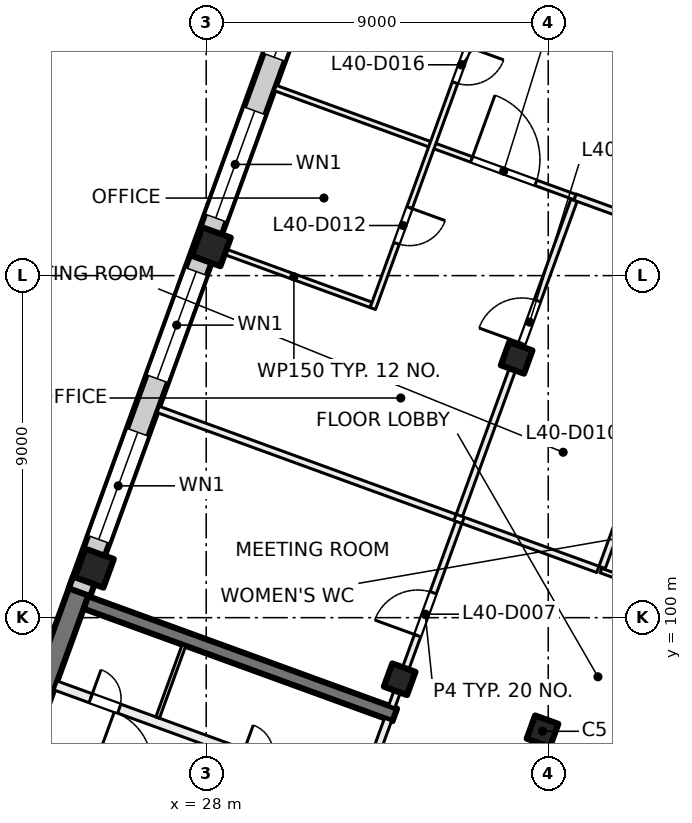
"""IFC4 building model, lengths in metres.
Left out: names, types, materials, properties, quantities, classifications, styles, units other than length and angle.
Written with IfcOpenShell. Run it as: python <this file> out.ifc"""

import sys

from ifc_helpers import new_model, si_unit, direction, frame, frame_2d, origin, origin_2d, place, context, subcontext, project, spatial, rectangle, extrude, element, fill, save


model = new_model("IFC4")
c1 = context("Model", 3, precision=1e-05, world=origin(), true_north=direction((0.0, 1.0)))
c2 = subcontext(c1, "Body", "Model", "MODEL_VIEW")
j1 = project(units=[si_unit("LENGTHUNIT", "METRE"), si_unit("PLANEANGLEUNIT", "RADIAN")], contexts=[c1])
p1 = place(None, origin())
s1 = spatial("IfcSite", under=j1, at=p1, CompositionType="ELEMENT")
p2 = place(p1, origin())
s2 = spatial("IfcBuilding", under=s1, at=p2, CompositionType="ELEMENT")
p3 = place(p2, frame((0.0, 0.0, 170.5)))
s3 = spatial("IfcBuildingStorey", under=s2, at=p3, CompositionType="ELEMENT", Elevation=170.5)
for number, where, z_axis, x_axis in (
    (1, (36.849, 97.011, 0.0), (0.0, 0.0, 1.0), (-0.342, -0.94, 0.0)),
    (2, (36.169, 106.836, 0.0), (0.0, 0.0, 1.0), (-0.342, -0.94, 0.0)),
    (3, (33.091, 98.379, 0.0), (0.0, 0.0, 1.0), (-0.342, -0.94, 0.0)),
):
    element("IfcColumn", number, at=place(p3, frame(where, z_axis=z_axis, x_axis=x_axis)), inside=s3, PredefinedType="COLUMN", context=c2, shape_type="SweptSolid", body=[
        extrude(rectangle(XDim=0.65, YDim=0.65, at=origin_2d()), origin(), (0.0, 0.0, 1.0), 4.0),
    ])
for number, where, z_axis, x_axis in (
    (4, (28.134, 109.76, 0.0), (0.0, 0.0, 1.0), (-0.342, -0.94, 0.0)),
    (5, (25.056, 101.303, 0.0), (0.0, 0.0, 1.0), (-0.342, -0.94, 0.0)),
):
    element("IfcColumn", number, at=place(p3, frame(where, z_axis=z_axis, x_axis=x_axis)), inside=s3, PredefinedType="COLUMN", context=c2, shape_type="SweptSolid", body=[
        extrude(rectangle(XDim=0.8, YDim=0.8, at=origin_2d()), origin(), (0.0, 0.0, 1.0), 4.0),
    ])
p4 = place(p3, frame((21.694, 92.577, 0.0), z_axis=(0.0, 0.0, 1.0), x_axis=(0.342010253184, 0.939696220444, 0.0)))
e6 = element("IfcWall", 6, at=p4, inside=s3, PredefinedType="SHEAR", context=c2, shape_type="SweptSolid", body=[
    extrude(rectangle(XDim=8.95, YDim=0.55, at=frame_2d((4.475, 0.0))), origin(), (0.0, 0.0, 1.0), 4.0),
])
p5 = place(p3, frame((32.962, 97.441, 0.0), z_axis=(0.0, 0.0, 1.0), x_axis=(-0.939689545667, 0.342028592028, 0.0)))
e7 = element("IfcWall", 7, at=p5, inside=s3, PredefinedType="SHEAR", context=c2, shape_type="SweptSolid", body=[
    extrude(rectangle(XDim=8.65, YDim=0.35, at=frame_2d((4.325, 0.0))), origin(), (0.0, 0.0, 1.0), 4.0),
])
p6 = place(p3, frame((24.666, 100.669, 0.0), z_axis=(0.0, 0.0, 1.0), x_axis=(0.34201964167, 0.939692803373, 0.0)))
e8 = element("IfcWall", 8, at=p6, inside=s3, PredefinedType="SOLIDWALL", context=c2, shape_type="SweptSolid", body=[
    extrude(rectangle(XDim=32.884, YDim=0.6, at=frame_2d((16.442, 0.0))), origin(), (0.0, 0.0, 1.0), 3.625),
])
p7 = place(p6, frame((1.48, 0.0, 0.9)))
e9 = element("IfcOpeningElement", 9, at=p7, cuts=e8, PredefinedType="OPENING", context=c2, shape_type="SweptSolid", body=[
    extrude(rectangle(XDim=3.0, YDim=2.4, at=frame_2d((1.5, 1.2))), frame((0.0, 0.31, 0.0), z_axis=(0.0, -1.0, 0.0), x_axis=(1.0, 0.0, 0.0)), (0.0, 0.0, 1.0), 0.62),
])
p8 = place(p6, frame((5.98, 0.0, 0.9)))
e10 = element("IfcOpeningElement", 10, at=p8, cuts=e8, PredefinedType="OPENING", context=c2, shape_type="SweptSolid", body=[
    extrude(rectangle(XDim=3.0, YDim=2.4, at=frame_2d((1.5, 1.2))), frame((0.0, 0.31, 0.0), z_axis=(0.0, -1.0, 0.0), x_axis=(1.0, 0.0, 0.0)), (0.0, 0.0, 1.0), 0.62),
])
p9 = place(p6, frame((10.48, 0.0, 0.9)))
e11 = element("IfcOpeningElement", 11, at=p9, cuts=e8, PredefinedType="OPENING", context=c2, shape_type="SweptSolid", body=[
    extrude(rectangle(XDim=3.0, YDim=2.4, at=frame_2d((1.5, 1.2))), frame((0.0, 0.31, 0.0), z_axis=(0.0, -1.0, 0.0), x_axis=(1.0, 0.0, 0.0)), (0.0, 0.0, 1.0), 0.62),
])
p10 = place(p6, frame((14.98, 0.0, 0.9)))
e12 = element("IfcOpeningElement", 12, at=p10, cuts=e8, PredefinedType="OPENING", context=c2, shape_type="SweptSolid", body=[
    extrude(rectangle(XDim=3.0, YDim=2.4, at=frame_2d((1.5, 1.2))), frame((0.0, 0.31, 0.0), z_axis=(0.0, -1.0, 0.0), x_axis=(1.0, 0.0, 0.0)), (0.0, 0.0, 1.0), 0.62),
])
p11 = place(p6, frame((19.48, 0.0, 0.9)))
e13 = element("IfcOpeningElement", 13, at=p11, cuts=e8, PredefinedType="OPENING", context=c2, shape_type="SweptSolid", body=[
    extrude(rectangle(XDim=3.0, YDim=2.4, at=frame_2d((1.5, 1.2))), frame((0.0, 0.31, 0.0), z_axis=(0.0, -1.0, 0.0), x_axis=(1.0, 0.0, 0.0)), (0.0, 0.0, 1.0), 0.62),
])
p12 = place(p6, frame((23.98, 0.0, 0.9)))
e14 = element("IfcOpeningElement", 14, at=p12, cuts=e8, PredefinedType="OPENING", context=c2, shape_type="SweptSolid", body=[
    extrude(rectangle(XDim=3.0, YDim=2.4, at=frame_2d((1.5, 1.2))), frame((0.0, 0.31, 0.0), z_axis=(0.0, -1.0, 0.0), x_axis=(1.0, 0.0, 0.0)), (0.0, 0.0, 1.0), 0.62),
])
p13 = place(p6, frame((28.48, 0.0, 0.9)))
e15 = element("IfcOpeningElement", 15, at=p13, cuts=e8, PredefinedType="OPENING", context=c2, shape_type="SweptSolid", body=[
    extrude(rectangle(XDim=3.0, YDim=2.4, at=frame_2d((1.5, 1.2))), frame((0.0, 0.31, 0.0), z_axis=(0.0, -1.0, 0.0), x_axis=(1.0, 0.0, 0.0)), (0.0, 0.0, 1.0), 0.62),
])
p14 = place(p3, frame((31.459, 93.678, 0.0), z_axis=(0.0, 0.0, 1.0), x_axis=(0.341985870128, 0.939705094502, 0.0)))
e16 = element("IfcWall", 16, at=p14, inside=s3, PredefinedType="PARTITIONING", context=c2, shape_type="SweptSolid", body=[
    extrude(rectangle(XDim=3.875, YDim=0.2, at=frame_2d((1.938, 0.0))), origin(), (0.0, 0.0, 1.0), 3.625),
])
p15 = place(p14, frame((0.3, 0.0, 0.0)))
e17 = element("IfcOpeningElement", 17, at=p15, cuts=e16, PredefinedType="OPENING", context=c2, shape_type="SweptSolid", body=[
    extrude(rectangle(XDim=1.2, YDim=2.1, at=frame_2d((0.6, 1.05))), frame((0.0, 0.11, 0.0), z_axis=(0.0, -1.0, 0.0), x_axis=(1.0, 0.0, 0.0)), (0.0, 0.0, 1.0), 0.22),
])
p16 = place(p3, frame((23.483, 96.688, 0.0), z_axis=(0.0, 0.0, 1.0), x_axis=(0.939691007314, -0.342024576271, 0.0)))
e18 = element("IfcWall", 18, at=p16, inside=s3, PredefinedType="PARTITIONING", context=c2, shape_type="SweptSolid", body=[
    extrude(rectangle(XDim=8.425, YDim=0.2, at=frame_2d((4.212, 0.0))), origin(), (0.0, 0.0, 1.0), 3.625),
])
p17 = place(p16, frame((1.688, 0.0, 0.0)))
e19 = element("IfcOpeningElement", 19, at=p17, cuts=e18, PredefinedType="OPENING", context=c2, shape_type="SweptSolid", body=[
    extrude(rectangle(XDim=1.5, YDim=2.1, at=frame_2d((0.75, 1.05))), frame((0.0, 0.11, 0.0), z_axis=(0.0, -1.0, 0.0), x_axis=(1.0, 0.0, 0.0)), (0.0, 0.0, 1.0), 0.22),
])
p18 = place(p3, frame((24.039, 98.215, 0.0), z_axis=(0.0, 0.0, 1.0), x_axis=(0.939687617333, -0.342033889887, 0.0)))
e20 = element("IfcWall", 20, at=p18, inside=s3, PredefinedType="PARTITIONING", context=c2, shape_type="SweptSolid", body=[
    extrude(rectangle(XDim=8.425, YDim=0.25, at=frame_2d((4.212, 0.0))), origin(), (0.0, 0.0, 1.0), 3.625),
])
p19 = place(p18, frame((5.242, 0.0, 0.0)))
e21 = element("IfcOpeningElement", 21, at=p19, cuts=e20, PredefinedType="OPENING", context=c2, shape_type="SweptSolid", body=[
    extrude(rectangle(XDim=0.8, YDim=2.1, at=frame_2d((0.4, 1.05))), frame((0.0, 0.135, 0.0), z_axis=(0.0, -1.0, 0.0), x_axis=(1.0, 0.0, 0.0)), (0.0, 0.0, 1.0), 0.27),
])
p20 = place(p18, frame((0.98, 0.0, 0.0)))
e22 = element("IfcOpeningElement", 22, at=p20, cuts=e20, PredefinedType="OPENING", context=c2, shape_type="SweptSolid", body=[
    extrude(rectangle(XDim=0.8, YDim=2.1, at=frame_2d((0.4, 1.05))), frame((0.0, 0.135, 0.0), z_axis=(0.0, -1.0, 0.0), x_axis=(1.0, 0.0, 0.0)), (0.0, 0.0, 1.0), 0.27),
])
p21 = place(p3, frame((26.722, 97.371, 0.0), z_axis=(0.0, 0.0, 1.0), x_axis=(0.342004391282, 0.939698353911, 0.0)))
e23 = element("IfcWall", 23, at=p21, inside=s3, PredefinedType="PARTITIONING", context=c2, shape_type="SweptSolid", body=[
    extrude(rectangle(XDim=2.025, YDim=0.1, at=frame_2d((1.013, 0.0))), origin(), (0.0, 0.0, 1.0), 3.625),
])
p22 = place(p3, frame((26.736, 105.48, 0.0), z_axis=(0.0, 0.0, 1.0), x_axis=(0.939705074886, -0.341985924028, 0.0)))
e24 = element("IfcWall", 24, at=p22, inside=s3, PredefinedType="PARTITIONING", context=c2, shape_type="SweptSolid", body=[
    extrude(rectangle(XDim=8.313, YDim=0.175, at=frame_2d((4.157, 0.0))), origin(), (0.0, 0.0, 1.0), 3.625),
])
p23 = place(p3, frame((29.814, 113.938, 0.0), z_axis=(0.0, 0.0, 1.0), x_axis=(0.939698351515, -0.342004397867, 0.0)))
e25 = element("IfcWall", 25, at=p23, inside=s3, PredefinedType="PARTITIONING", context=c2, shape_type="SweptSolid", body=[
    extrude(rectangle(XDim=8.401, YDim=0.15, at=frame_2d((4.2, 0.0))), origin(), (0.0, 0.0, 1.0), 3.625),
])
p24 = place(p23, frame((5.5, 0.0, 0.0)))
e26 = element("IfcOpeningElement", 26, at=p24, cuts=e25, PredefinedType="OPENING", context=c2, shape_type="SweptSolid", body=[
    extrude(rectangle(XDim=1.8, YDim=2.1, at=frame_2d((0.9, 1.05))), frame((0.0, 0.085, 0.0), z_axis=(0.0, -1.0, 0.0), x_axis=(1.0, 0.0, 0.0)), (0.0, 0.0, 1.0), 0.17),
])
p25 = place(p3, frame((32.34, 108.23, 0.0), z_axis=(0.0, 0.0, 1.0), x_axis=(-0.939737385516, 0.341897128188, 0.0)))
e27 = element("IfcWall", 27, at=p25, inside=s3, PredefinedType="PARTITIONING", context=c2, shape_type="SweptSolid", body=[
    extrude(rectangle(XDim=4.326, YDim=0.15, at=frame_2d((2.163, 0.0))), origin(), (0.0, 0.0, 1.0), 3.625),
])
p26 = place(p3, frame((37.053, 120.96, 0.0), z_axis=(0.0, 0.0, 1.0), x_axis=(-0.342064742067, -0.939676386973, 0.0)))
e28 = element("IfcWall", 28, at=p26, inside=s3, PredefinedType="PARTITIONING", context=c2, shape_type="SweptSolid", body=[
    extrude(rectangle(XDim=13.649, YDim=0.15, at=frame_2d((6.825, 0.0))), origin(), (0.0, 0.0, 1.0), 3.625),
])
p27 = place(p26, frame((10.824, 0.0, 0.0)))
e29 = element("IfcOpeningElement", 29, at=p27, cuts=e28, PredefinedType="OPENING", context=c2, shape_type="SweptSolid", body=[
    extrude(rectangle(XDim=1.0, YDim=2.1, at=frame_2d((0.5, 1.05))), frame((0.0, 0.085, 0.0), z_axis=(0.0, -1.0, 0.0), x_axis=(1.0, 0.0, 0.0)), (0.0, 0.0, 1.0), 0.17),
])
p28 = place(p26, frame((6.324, 0.0, 0.0)))
e30 = element("IfcOpeningElement", 30, at=p28, cuts=e28, PredefinedType="OPENING", context=c2, shape_type="SweptSolid", body=[
    extrude(rectangle(XDim=1.0, YDim=2.1, at=frame_2d((0.5, 1.05))), frame((0.0, 0.085, 0.0), z_axis=(0.0, -1.0, 0.0), x_axis=(1.0, 0.0, 0.0)), (0.0, 0.0, 1.0), 0.17),
])
p29 = place(p26, frame((1.824, 0.0, 0.0)))
e31 = element("IfcOpeningElement", 31, at=p29, cuts=e28, PredefinedType="OPENING", context=c2, shape_type="SweptSolid", body=[
    extrude(rectangle(XDim=1.0, YDim=2.1, at=frame_2d((0.5, 1.05))), frame((0.0, 0.085, 0.0), z_axis=(0.0, -1.0, 0.0), x_axis=(1.0, 0.0, 0.0)), (0.0, 0.0, 1.0), 0.17),
])
p30 = place(p3, frame((32.881, 97.657, 0.0), z_axis=(0.0, 0.0, 1.0), x_axis=(0.342058204353, 0.939678766832, 0.0)))
e32 = element("IfcWall", 32, at=p30, inside=s3, PredefinedType="PARTITIONING", context=c2, shape_type="SweptSolid", body=[
    extrude(rectangle(XDim=5.163, YDim=0.175, at=frame_2d((2.581, 0.0))), origin(), (0.0, 0.0, 1.0), 3.625),
])
p31 = place(p30, frame((1.991, 0.0, 0.0)))
e33 = element("IfcOpeningElement", 33, at=p31, cuts=e32, PredefinedType="OPENING", context=c2, shape_type="SweptSolid", body=[
    extrude(rectangle(XDim=1.2, YDim=2.1, at=frame_2d((0.6, 1.05))), frame((0.0, 0.097, 0.0), z_axis=(0.0, -1.0, 0.0), x_axis=(1.0, 0.0, 0.0)), (0.0, 0.0, 1.0), 0.195),
])
p32 = place(p3, frame((34.759, 102.56, 0.0), z_axis=(0.0, 0.0, 1.0), x_axis=(0.939770757411, -0.341805388365, 0.0)))
e34 = element("IfcWall", 34, at=p32, inside=s3, PredefinedType="PARTITIONING", context=c2, shape_type="SweptSolid", body=[
    extrude(rectangle(XDim=3.774, YDim=0.175, at=frame_2d((1.887, 0.0))), origin(), (0.0, 0.0, 1.0), 3.625),
])
p33 = place(p3, frame((34.66, 102.689, 0.0), z_axis=(0.0, 0.0, 1.0), x_axis=(0.341951828534, 0.939717482524, 0.0)))
e35 = element("IfcWall", 35, at=p33, inside=s3, PredefinedType="PARTITIONING", context=c2, shape_type="SweptSolid", body=[
    extrude(rectangle(XDim=8.826, YDim=0.175, at=frame_2d((4.413, 0.0))), origin(), (0.0, 0.0, 1.0), 3.625),
])
p34 = place(p33, frame((4.813, 0.0, 0.0)))
e36 = element("IfcOpeningElement", 36, at=p34, cuts=e35, PredefinedType="OPENING", context=c2, shape_type="SweptSolid", body=[
    extrude(rectangle(XDim=1.2, YDim=2.1, at=frame_2d((0.6, 1.05))), frame((0.0, 0.097, 0.0), z_axis=(0.0, -1.0, 0.0), x_axis=(1.0, 0.0, 0.0)), (0.0, 0.0, 1.0), 0.195),
])
p35 = place(p3, frame((38.385, 101.24, 0.0), z_axis=(0.0, 0.0, 1.0), x_axis=(0.939711088937, -0.341969398235, 0.0)))
e37 = element("IfcWall", 37, at=p35, inside=s3, PredefinedType="PARTITIONING", context=c2, shape_type="SweptSolid", body=[
    extrude(rectangle(XDim=4.503, YDim=0.125, at=frame_2d((2.252, 0.0))), origin(), (0.0, 0.0, 1.0), 3.625),
])
p36 = place(p3, frame((38.418, 101.322, 0.0), z_axis=(0.0, 0.0, 1.0), x_axis=(0.342101536507, 0.939662992099, 0.0)))
e38 = element("IfcWall", 38, at=p36, inside=s3, PredefinedType="PARTITIONING", context=c2, shape_type="SweptSolid", body=[
    extrude(rectangle(XDim=8.913, YDim=0.175, at=frame_2d((4.457, 0.0))), origin(), (0.0, 0.0, 1.0), 3.625),
])
p37 = place(p3, frame((41.467, 109.697, 0.0), z_axis=(0.0, 0.0, 1.0), x_axis=(-0.939713209288, 0.341963571582, 0.0)))
e39 = element("IfcWall", 39, at=p37, inside=s3, PredefinedType="PARTITIONING", context=c2, shape_type="SweptSolid", body=[
    extrude(rectangle(XDim=4.0, YDim=0.175, at=frame_2d((2.0, 0.0))), origin(), (0.0, 0.0, 1.0), 3.625),
])
p38 = place(p7, origin())
e40 = element("IfcWindow", 40, at=p38, inside=s3, PartitioningType="SINGLE_PANEL", PredefinedType="WINDOW", context=c2, shape_type="SweptSolid", body=[
    extrude(rectangle(XDim=3.0, YDim=2.4, at=frame_2d((1.5, 1.2))), frame((0.0, 0.03, 0.0), z_axis=(0.0, -1.0, 0.0), x_axis=(1.0, 0.0, 0.0)), (0.0, 0.0, 1.0), 0.06),
])
fill(e9, e40)
p39 = place(p8, origin())
e41 = element("IfcWindow", 41, at=p39, inside=s3, PartitioningType="SINGLE_PANEL", PredefinedType="WINDOW", context=c2, shape_type="SweptSolid", body=[
    extrude(rectangle(XDim=3.0, YDim=2.4, at=frame_2d((1.5, 1.2))), frame((0.0, 0.03, 0.0), z_axis=(0.0, -1.0, 0.0), x_axis=(1.0, 0.0, 0.0)), (0.0, 0.0, 1.0), 0.06),
])
fill(e10, e41)
p40 = place(p9, origin())
e42 = element("IfcWindow", 42, at=p40, inside=s3, PartitioningType="SINGLE_PANEL", PredefinedType="WINDOW", context=c2, shape_type="SweptSolid", body=[
    extrude(rectangle(XDim=3.0, YDim=2.4, at=frame_2d((1.5, 1.2))), frame((0.0, 0.03, 0.0), z_axis=(0.0, -1.0, 0.0), x_axis=(1.0, 0.0, 0.0)), (0.0, 0.0, 1.0), 0.06),
])
fill(e11, e42)
p41 = place(p10, origin())
e43 = element("IfcWindow", 43, at=p41, inside=s3, PartitioningType="SINGLE_PANEL", PredefinedType="WINDOW", context=c2, shape_type="SweptSolid", body=[
    extrude(rectangle(XDim=3.0, YDim=2.4, at=frame_2d((1.5, 1.2))), frame((0.0, 0.03, 0.0), z_axis=(0.0, -1.0, 0.0), x_axis=(1.0, 0.0, 0.0)), (0.0, 0.0, 1.0), 0.06),
])
fill(e12, e43)
p42 = place(p20, origin())
e44 = element("IfcDoor", 44, at=p42, inside=s3, OperationType="SINGLE_SWING_RIGHT", PredefinedType="DOOR", context=c2, shape_type="SweptSolid", body=[
    extrude(rectangle(XDim=0.8, YDim=2.1, at=frame_2d((0.4, 1.05))), frame((0.0, 0.025, 0.0), z_axis=(0.0, -1.0, 0.0), x_axis=(1.0, 0.0, 0.0)), (0.0, 0.0, 1.0), 0.05),
])
fill(e22, e44)
p43 = place(p31, origin())
e45 = element("IfcDoor", 45, at=p43, inside=s3, OperationType="DOUBLE_DOOR_SINGLE_SWING", PredefinedType="DOOR", context=c2, shape_type="SweptSolid", body=[
    extrude(rectangle(XDim=1.2, YDim=2.1, at=frame_2d((0.6, 1.05))), frame((0.0, 0.025, 0.0), z_axis=(0.0, -1.0, 0.0), x_axis=(1.0, 0.0, 0.0)), (0.0, 0.0, 1.0), 0.05),
])
fill(e33, e45)
p44 = place(p27, origin())
e46 = element("IfcDoor", 46, at=p44, inside=s3, OperationType="SINGLE_SWING_LEFT", PredefinedType="DOOR", context=c2, shape_type="SweptSolid", body=[
    extrude(rectangle(XDim=1.0, YDim=2.1, at=frame_2d((0.5, 1.05))), frame((0.0, 0.025, 0.0), z_axis=(0.0, -1.0, 0.0), x_axis=(1.0, 0.0, 0.0)), (0.0, 0.0, 1.0), 0.05),
])
fill(e29, e46)
p45 = place(p24, origin())
e47 = element("IfcDoor", 47, at=p45, inside=s3, OperationType="DOUBLE_DOOR_SINGLE_SWING", PredefinedType="DOOR", context=c2, shape_type="SweptSolid", body=[
    extrude(rectangle(XDim=1.8, YDim=2.1, at=frame_2d((0.9, 1.05))), frame((0.0, 0.025, 0.0), z_axis=(0.0, -1.0, 0.0), x_axis=(1.0, 0.0, 0.0)), (0.0, 0.0, 1.0), 0.05),
])
fill(e26, e47)
p46 = place(p28, origin())
e48 = element("IfcDoor", 48, at=p46, inside=s3, OperationType="SINGLE_SWING_RIGHT", PredefinedType="DOOR", context=c2, shape_type="SweptSolid", body=[
    extrude(rectangle(XDim=1.0, YDim=2.1, at=frame_2d((0.5, 1.05))), frame((0.0, 0.025, 0.0), z_axis=(0.0, -1.0, 0.0), x_axis=(1.0, 0.0, 0.0)), (0.0, 0.0, 1.0), 0.05),
])
fill(e30, e48)
p47 = place(p34, origin())
e49 = element("IfcDoor", 49, at=p47, inside=s3, OperationType="DOUBLE_DOOR_SINGLE_SWING", PredefinedType="DOOR", context=c2, shape_type="SweptSolid", body=[
    extrude(rectangle(XDim=1.2, YDim=2.1, at=frame_2d((0.6, 1.05))), frame((0.0, 0.025, 0.0), z_axis=(0.0, -1.0, 0.0), x_axis=(1.0, 0.0, 0.0)), (0.0, 0.0, 1.0), 0.05),
])
fill(e36, e49)
save(model, sys.argv[1])
